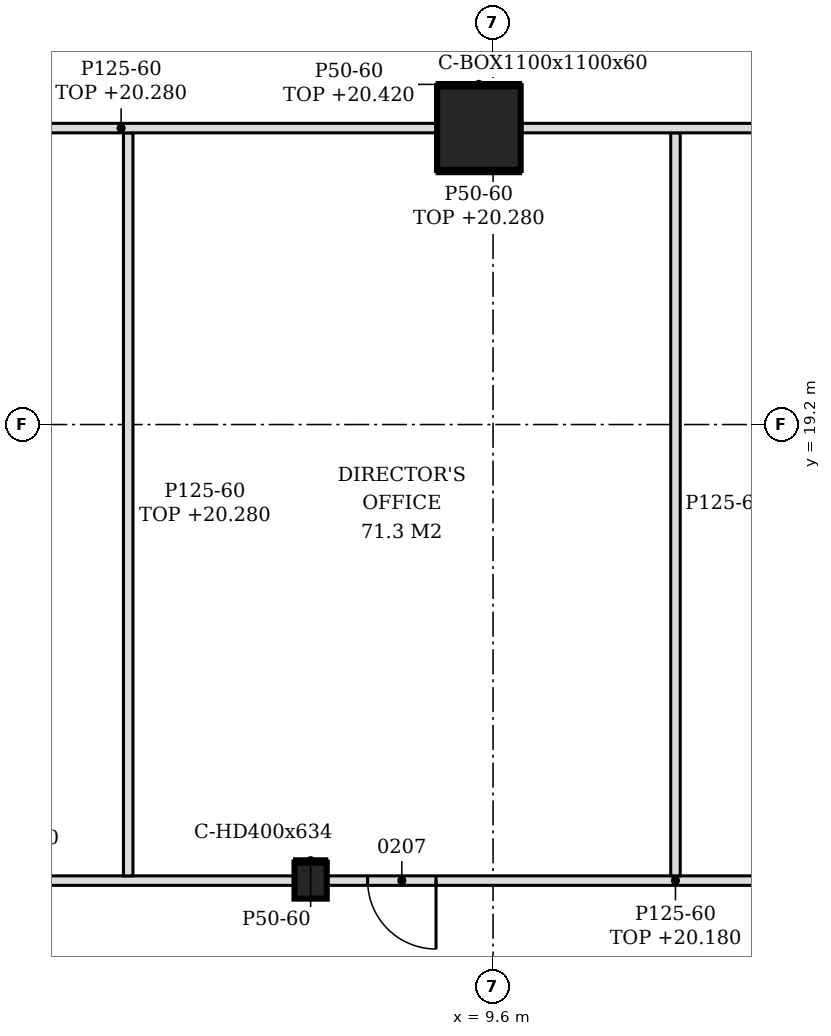
"""IFC4 building model, lengths in metres.
Left out: names, types, materials, properties, quantities, classifications, styles, units other than length and angle.
Written with IfcOpenShell. Run it as: python <this file> out.ifc"""

import sys

from ifc_helpers import new_model, si_unit, direction, frame, frame_2d, origin, origin_2d, place, context, subcontext, project, spatial, polyline, rectangle, hollow_rectangle, i_section, outline, extrude, element, fill, save


model = new_model("IFC4")
c1 = context("Model", 3, precision=1e-05, world=origin(), true_north=direction((0.0, 1.0)))
c2 = subcontext(c1, "Body", "Model", "MODEL_VIEW")
j1 = project(units=[si_unit("LENGTHUNIT", "METRE"), si_unit("PLANEANGLEUNIT", "RADIAN")], contexts=[c1])
p1 = place(None, origin())
s1 = spatial("IfcSite", under=j1, at=p1, CompositionType="ELEMENT")
p2 = place(p1, origin())
s2 = spatial("IfcBuilding", under=s1, at=p2, CompositionType="ELEMENT")
p3 = place(p2, frame((0.0, 0.0, 15.0)))
s3 = spatial("IfcBuildingStorey", under=s2, at=p3, CompositionType="ELEMENT", Elevation=15.0)
p4 = place(p3, frame((9.414, 23.1, -0.2), z_axis=(0.0, 0.0, 1.0), x_axis=(1.0, 0.0, 0.0)))
e1 = element("IfcColumn", 1, at=p4, inside=s3, PredefinedType="COLUMN", context=c2, shape_type="SweptSolid", body=[
    extrude(hollow_rectangle(XDim=1.1, YDim=1.1, WallThickness=0.06, at=origin_2d()), origin(), (0.0, 0.0, 1.0), 6.0),
])
p5 = place(p3, frame((7.2, 13.2, -0.2), z_axis=(0.0, 0.0, 1.0), x_axis=(1.0, 0.0, 0.0)))
e2 = element("IfcColumn", 2, at=p5, inside=s3, PredefinedType="COLUMN", context=c2, shape_type="SweptSolid", body=[
    extrude(i_section(OverallWidth=0.424, OverallDepth=0.474, WebThickness=0.048, FlangeThickness=0.077, FilletRadius=0.015, at=origin_2d()), origin(), (0.0, 0.0, 1.0), 6.0),
])
p6 = place(p3, frame((-4.588, 13.2, 0.0), z_axis=(0.0, 0.0, 1.0), x_axis=(1.0, 0.0, 0.0)))
e3 = element("IfcWall", 3, at=p6, inside=s3, PredefinedType="PARTITIONING", context=c2, shape_type="SweptSolid", body=[
    extrude(rectangle(XDim=11.576, YDim=0.125, at=frame_2d((5.788, 0.0))), origin(), (0.0, 0.0, 1.0), 5.18),
])
p7 = place(p6, frame((4.138, 0.0, 0.0)))
e4 = element("IfcOpeningElement", 4, at=p7, cuts=e3, PredefinedType="OPENING", context=c2, shape_type="SweptSolid", body=[
    extrude(rectangle(XDim=0.9, YDim=2.1, at=frame_2d((0.45, 1.05))), frame((0.0, 0.073, 0.0), z_axis=(0.0, -1.0, 0.0), x_axis=(1.0, 0.0, 0.0)), (0.0, 0.0, 1.0), 0.145),
])
p8 = place(p3, frame((7.412, 13.2, 0.0), z_axis=(0.0, 0.0, 1.0), x_axis=(1.0, 0.0, 0.0)))
e5 = element("IfcWall", 5, at=p8, inside=s3, PredefinedType="PARTITIONING", context=c2, shape_type="SweptSolid", body=[
    extrude(rectangle(XDim=11.576, YDim=0.125, at=frame_2d((5.788, 0.0))), origin(), (0.0, 0.0, 1.0), 5.18),
])
p9 = place(p8, frame((0.538, 0.0, 0.0)))
e6 = element("IfcOpeningElement", 6, at=p9, cuts=e5, PredefinedType="OPENING", context=c2, shape_type="SweptSolid", body=[
    extrude(rectangle(XDim=0.9, YDim=2.1, at=frame_2d((0.45, 1.05))), frame((0.0, 0.073, 0.0), z_axis=(0.0, -1.0, 0.0), x_axis=(1.0, 0.0, 0.0)), (0.0, 0.0, 1.0), 0.145),
])
p10 = place(p8, frame((7.738, 0.0, 0.0)))
e7 = element("IfcOpeningElement", 7, at=p10, cuts=e5, PredefinedType="OPENING", context=c2, shape_type="SweptSolid", body=[
    extrude(rectangle(XDim=0.9, YDim=2.1, at=frame_2d((0.45, 1.05))), frame((0.0, 0.073, 0.0), z_axis=(0.0, -1.0, 0.0), x_axis=(1.0, 0.0, 0.0)), (0.0, 0.0, 1.0), 0.145),
])
p11 = place(p3, frame((4.8, 13.262, 0.0), z_axis=(0.0, 0.0, 1.0), x_axis=(0.0, 1.0, 0.0)))
e8 = element("IfcWall", 8, at=p11, inside=s3, PredefinedType="PARTITIONING", context=c2, shape_type="SweptSolid", body=[
    extrude(outline(polyline([(0.0, 0.0), (9.775, 0.0), (9.775, 5.28), (0.087, 5.28), (0.085, 5.18), (0.0, 5.18), (0.0, 0.0)])), frame((0.0, 0.062, 0.0), z_axis=(0.0, -1.0, 0.0), x_axis=(1.0, 0.0, 0.0)), (0.0, 0.0, 1.0), 0.125),
])
p12 = place(p3, frame((12.0, 13.262, 0.0), z_axis=(0.0, 0.0, 1.0), x_axis=(0.0, 1.0, 0.0)))
e9 = element("IfcWall", 9, at=p12, inside=s3, PredefinedType="PARTITIONING", context=c2, shape_type="SweptSolid", body=[
    extrude(outline(polyline([(0.0, 0.0), (9.775, 0.0), (9.775, 5.28), (9.688, 5.28), (9.686, 5.8), (0.087, 5.8), (0.085, 5.18), (0.0, 5.18), (0.0, 0.0)])), frame((0.0, 0.062, 0.0), z_axis=(0.0, -1.0, 0.0), x_axis=(1.0, 0.0, 0.0)), (0.0, 0.0, 1.0), 0.125),
])
for number, where, z_axis, x_axis in (
    (10, (0.55, 23.1, 0.0), (0.0, 0.0, 1.0), (1.0, 0.0, 0.0)),
    (11, (9.964, 23.1, 0.0), (0.0, 0.0, 1.0), (1.0, 0.0, 0.0)),
):
    element("IfcWall", number, at=place(p3, frame(where, z_axis=z_axis, x_axis=x_axis)), inside=s3, PredefinedType="PARTITIONING", context=c2, shape_type="SweptSolid", body=[
        extrude(rectangle(XDim=8.313, YDim=0.125, at=frame_2d((4.157, 0.0))), origin(), (0.0, 0.0, 1.0), 5.28),
    ])
p13 = place(p3, frame((6.988, 13.462, 0.0), z_axis=(0.0, 0.0, 1.0), x_axis=(1.0, 0.0, 0.0)))
e12 = element("IfcWall", 12, at=p13, inside=s3, PredefinedType="PARTITIONING", context=c2, shape_type="SweptSolid", body=[
    extrude(rectangle(XDim=0.424, YDim=0.05, at=frame_2d((0.212, 0.0))), origin(), (0.0, 0.0, 1.0), 5.8),
])
p14 = place(p3, frame((8.864, 22.525, 0.0), z_axis=(0.0, 0.0, 1.0), x_axis=(1.0, 0.0, 0.0)))
e13 = element("IfcWall", 13, at=p14, inside=s3, PredefinedType="PARTITIONING", context=c2, shape_type="SweptSolid", body=[
    extrude(rectangle(XDim=1.1, YDim=0.05, at=frame_2d((0.55, 0.0))), origin(), (0.0, 0.0, 1.0), 5.28),
])
p15 = place(p3, frame((8.864, 23.675, 0.0), z_axis=(0.0, 0.0, 1.0), x_axis=(1.0, 0.0, 0.0)))
e14 = element("IfcWall", 14, at=p15, inside=s3, PredefinedType="PARTITIONING", context=c2, shape_type="SweptSolid", body=[
    extrude(rectangle(XDim=1.1, YDim=0.05, at=frame_2d((0.55, 0.0))), origin(), (0.0, 0.0, 1.0), 5.42),
])
p16 = place(p9, frame((0.9, 0.0, 0.0), z_axis=(0.0, 0.0, 1.0), x_axis=(-1.0, 0.0, 0.0)))
e15 = element("IfcDoor", 15, at=p16, inside=s3, OperationType="SINGLE_SWING_LEFT", PredefinedType="DOOR", context=c2, shape_type="SweptSolid", body=[
    extrude(rectangle(XDim=0.9, YDim=2.1, at=frame_2d((0.45, 1.05))), frame((0.0, 0.025, 0.0), z_axis=(0.0, -1.0, 0.0), x_axis=(1.0, 0.0, 0.0)), (0.0, 0.0, 1.0), 0.05),
])
fill(e6, e15)
save(model, sys.argv[1])
